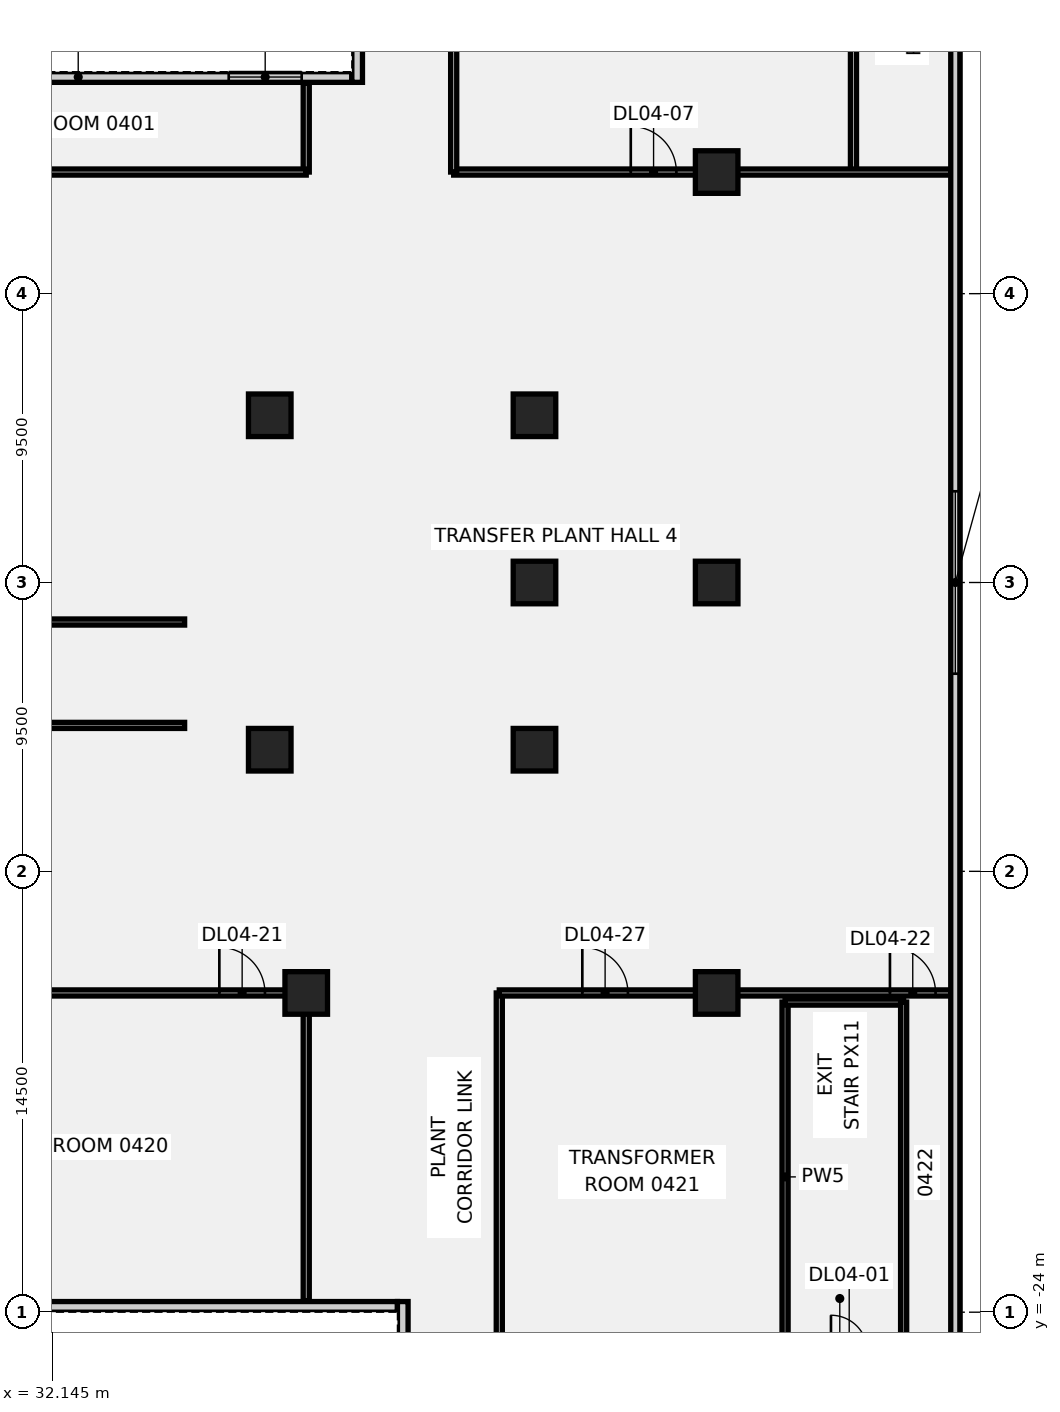
"""IFC4 building model, lengths in metres.
Left out: names, types, materials, properties, quantities, classifications, styles, units other than length and angle.
Written with IfcOpenShell. Run it as: python <this file> out.ifc"""

import sys

from ifc_helpers import new_model, si_unit, direction, frame, frame_2d, origin, origin_2d, place, context, subcontext, project, spatial, polyline, rectangle, outline, extrude, element, fill, save


model = new_model("IFC4")
c1 = context("Model", 3, precision=1e-05, world=origin(), true_north=direction((0.0, 1.0)))
c2 = subcontext(c1, "Body", "Model", "MODEL_VIEW")
j1 = project(units=[si_unit("LENGTHUNIT", "METRE"), si_unit("PLANEANGLEUNIT", "RADIAN")], contexts=[c1])
p1 = place(None, origin())
s1 = spatial("IfcSite", under=j1, at=p1, CompositionType="ELEMENT")
p2 = place(p1, origin())
s2 = spatial("IfcBuilding", under=s1, at=p2, CompositionType="ELEMENT")
p3 = place(p2, frame((0.0, 0.0, 25.0)))
s3 = spatial("IfcBuildingStorey", under=s2, at=p3, CompositionType="ELEMENT", Elevation=25.0)
for number, where, z_axis, x_axis in (
    (1, (39.3, 5.5, -0.45), (0.0, 0.0, 1.0), (1.0, 0.0, 0.0)),
    (2, (39.3, -5.5, -0.45), (0.0, 0.0, 1.0), (1.0, 0.0, 0.0)),
    (3, (48.008, -5.5, -0.45), (0.0, 0.0, 1.0), (1.0, 0.0, 0.0)),
    (4, (48.008, 0.0, -0.45), (0.0, 0.0, 1.0), (1.0, 0.0, 0.0)),
    (5, (48.008, 5.5, -0.45), (0.0, 0.0, 1.0), (1.0, 0.0, 0.0)),
    (6, (40.5, -13.5, -0.45), (0.0, 0.0, 1.0), (1.0, 0.0, 0.0)),
    (7, (54.0, -13.5, -0.45), (0.0, 0.0, 1.0), (1.0, 0.0, 0.0)),
    (8, (54.0, 0.0, -0.45), (0.0, 0.0, 1.0), (1.0, 0.0, 0.0)),
    (9, (54.0, 13.5, -0.45), (0.0, 0.0, 1.0), (1.0, 0.0, 0.0)),
):
    element("IfcColumn", number, at=place(p3, frame(where, z_axis=z_axis, x_axis=x_axis)), inside=s3, PredefinedType="COLUMN", context=c2, shape_type="SweptSolid", body=[
        extrude(rectangle(XDim=1.4, YDim=1.4, at=origin_2d()), origin(), (0.0, 0.0, 1.0), 4.35),
    ])
p4 = place(p3, frame((56.25, -25.3, 0.0), z_axis=(0.0, 0.0, 1.0), x_axis=(0.0, 1.0, 0.0)))
e10 = element("IfcWall", 10, at=p4, inside=s3, PredefinedType="PARTITIONING", context=c2, shape_type="SweptSolid", body=[
    extrude(rectangle(XDim=11.5, YDim=0.2, at=frame_2d((5.75, 0.0))), origin(), (0.0, 0.0, 1.0), 3.9),
])
p5 = place(p3, frame((56.25, -13.8, 0.0), z_axis=(0.0, 0.0, 1.0), x_axis=(1.0, 0.0, 0.0)))
e11 = element("IfcWall", 11, at=p5, inside=s3, PredefinedType="PARTITIONING", context=c2, shape_type="SweptSolid", body=[
    extrude(rectangle(XDim=3.9, YDim=0.2, at=frame_2d((1.95, 0.0))), origin(), (0.0, 0.0, 1.0), 3.9),
])
p6 = place(p3, frame((60.15, -25.3, 0.0), z_axis=(0.0, 0.0, 1.0), x_axis=(0.0, 1.0, 0.0)))
e12 = element("IfcWall", 12, at=p6, inside=s3, PredefinedType="PARTITIONING", context=c2, shape_type="SweptSolid", body=[
    extrude(rectangle(XDim=11.5, YDim=0.2, at=frame_2d((5.75, 0.0))), origin(), (0.0, 0.0, 1.0), 3.9),
])
p7 = place(p3, frame((22.5, -13.5, 0.0), z_axis=(0.0, 0.0, 1.0), x_axis=(1.0, 0.0, 0.0)))
e13 = element("IfcWall", 13, at=p7, inside=s3, PredefinedType="PARTITIONING", context=c2, shape_type="SweptSolid", body=[
    extrude(rectangle(XDim=18.0, YDim=0.2, at=frame_2d((9.0, 0.0))), origin(), (0.0, 0.0, 1.0), 3.9),
])
p8 = place(p7, frame((15.142, 0.0, 0.0)))
e14 = element("IfcOpeningElement", 14, at=p8, cuts=e13, PredefinedType="OPENING", context=c2, shape_type="SweptSolid", body=[
    extrude(rectangle(XDim=1.5, YDim=2.1, at=frame_2d((0.75, 1.05))), frame((0.0, 0.11, 0.0), z_axis=(0.0, -1.0, 0.0), x_axis=(1.0, 0.0, 0.0)), (0.0, 0.0, 1.0), 0.22),
])
p9 = place(p3, frame((40.5, -23.62, 0.0), z_axis=(0.0, 0.0, 1.0), x_axis=(0.0, 1.0, 0.0)))
e15 = element("IfcWall", 15, at=p9, inside=s3, PredefinedType="PARTITIONING", context=c2, shape_type="SweptSolid", body=[
    extrude(rectangle(XDim=10.12, YDim=0.2, at=frame_2d((5.06, 0.0))), origin(), (0.0, 0.0, 1.0), 3.9),
])
p10 = place(p3, frame((40.5, 13.5, 0.0), z_axis=(0.0, 0.0, 1.0), x_axis=(0.0, 1.0, 0.0)))
e16 = element("IfcWall", 16, at=p10, inside=s3, PredefinedType="PARTITIONING", context=c2, shape_type="SweptSolid", body=[
    extrude(rectangle(XDim=2.92, YDim=0.2, at=frame_2d((1.46, 0.0))), origin(), (0.0, 0.0, 1.0), 3.9),
])
p11 = place(p3, frame((22.5, 13.5, 0.0), z_axis=(0.0, 0.0, 1.0), x_axis=(1.0, 0.0, 0.0)))
e17 = element("IfcWall", 17, at=p11, inside=s3, PredefinedType="PARTITIONING", context=c2, shape_type="SweptSolid", body=[
    extrude(rectangle(XDim=18.0, YDim=0.2, at=frame_2d((9.0, 0.0))), origin(), (0.0, 0.0, 1.0), 3.9),
])
p12 = place(p11, frame((4.019, 0.0, 0.0)))
e18 = element("IfcOpeningElement", 18, at=p12, cuts=e17, PredefinedType="OPENING", context=c2, shape_type="SweptSolid", body=[
    extrude(rectangle(XDim=1.5, YDim=2.1, at=frame_2d((0.75, 1.05))), frame((0.0, 0.11, 0.0), z_axis=(0.0, -1.0, 0.0), x_axis=(1.0, 0.0, 0.0)), (0.0, 0.0, 1.0), 0.22),
])
p13 = place(p3, frame((46.85, -25.0, 0.0), z_axis=(0.0, 0.0, 1.0), x_axis=(0.0, 1.0, 0.0)))
e19 = element("IfcWall", 19, at=p13, inside=s3, PredefinedType="PARTITIONING", context=c2, shape_type="SweptSolid", body=[
    extrude(rectangle(XDim=11.5, YDim=0.2, at=frame_2d((5.75, 0.0))), origin(), (0.0, 0.0, 1.0), 3.9),
])
p14 = place(p3, frame((46.85, -13.5, 0.0), z_axis=(0.0, 0.0, 1.0), x_axis=(1.0, 0.0, 0.0)))
e20 = element("IfcWall", 20, at=p14, inside=s3, PredefinedType="PARTITIONING", context=c2, shape_type="SweptSolid", body=[
    extrude(rectangle(XDim=14.849, YDim=0.2, at=frame_2d((7.424, 0.0))), origin(), (0.0, 0.0, 1.0), 3.9),
])
p15 = place(p14, frame((12.85, 0.0, 0.0)))
e21 = element("IfcOpeningElement", 21, at=p15, cuts=e20, PredefinedType="OPENING", context=c2, shape_type="SweptSolid", body=[
    extrude(rectangle(XDim=1.5, YDim=2.1, at=frame_2d((0.75, 1.05))), frame((0.0, 0.11, 0.0), z_axis=(0.0, -1.0, 0.0), x_axis=(1.0, 0.0, 0.0)), (0.0, 0.0, 1.0), 0.22),
])
p16 = place(p14, frame((2.731, 0.0, 0.0)))
e22 = element("IfcOpeningElement", 22, at=p16, cuts=e20, PredefinedType="OPENING", context=c2, shape_type="SweptSolid", body=[
    extrude(rectangle(XDim=1.5, YDim=2.1, at=frame_2d((0.75, 1.05))), frame((0.0, 0.11, 0.0), z_axis=(0.0, -1.0, 0.0), x_axis=(1.0, 0.0, 0.0)), (0.0, 0.0, 1.0), 0.22),
])
p17 = place(p3, frame((58.5, 13.5, 0.0), z_axis=(0.0, 0.0, 1.0), x_axis=(0.0, 1.0, 0.0)))
e23 = element("IfcWall", 23, at=p17, inside=s3, PredefinedType="PARTITIONING", context=c2, shape_type="SweptSolid", body=[
    extrude(rectangle(XDim=11.5, YDim=0.2, at=frame_2d((5.75, 0.0))), origin(), (0.0, 0.0, 1.0), 3.9),
])
p18 = place(p3, frame((45.35, 13.5, 0.0), z_axis=(0.0, 0.0, 1.0), x_axis=(1.0, 0.0, 0.0)))
e24 = element("IfcWall", 24, at=p18, inside=s3, PredefinedType="PARTITIONING", context=c2, shape_type="SweptSolid", body=[
    extrude(rectangle(XDim=16.349, YDim=0.2, at=frame_2d((8.174, 0.0))), origin(), (0.0, 0.0, 1.0), 3.9),
])
p19 = place(p18, frame((5.825, 0.0, 0.0)))
e25 = element("IfcOpeningElement", 25, at=p19, cuts=e24, PredefinedType="OPENING", context=c2, shape_type="SweptSolid", body=[
    extrude(rectangle(XDim=1.5, YDim=2.1, at=frame_2d((0.75, 1.05))), frame((0.0, 0.11, 0.0), z_axis=(0.0, -1.0, 0.0), x_axis=(1.0, 0.0, 0.0)), (0.0, 0.0, 1.0), 0.22),
])
p20 = place(p3, frame((45.35, 13.5, 0.0), z_axis=(0.0, 0.0, 1.0), x_axis=(0.0, 1.0, 0.0)))
e26 = element("IfcWall", 26, at=p20, inside=s3, PredefinedType="PARTITIONING", context=c2, shape_type="SweptSolid", body=[
    extrude(rectangle(XDim=11.5, YDim=0.2, at=frame_2d((5.75, 0.0))), origin(), (0.0, 0.0, 1.0), 3.9),
])
p21 = place(p3, frame((61.85, -50.988, 0.0), z_axis=(0.0, 0.0, 1.0), x_axis=(0.0, 1.0, 0.0)))
e27 = element("IfcWall", 27, at=p21, inside=s3, PredefinedType="SOLIDWALL", context=c2, shape_type="SweptSolid", body=[
    extrude(rectangle(XDim=101.977, YDim=0.3, at=frame_2d((50.988, 0.0))), origin(), (0.0, 0.0, 1.0), 3.9),
])
p22 = place(p21, frame((47.988, 0.0, 1.4)))
e28 = element("IfcOpeningElement", 28, at=p22, cuts=e27, PredefinedType="OPENING", context=c2, shape_type="SweptSolid", body=[
    extrude(rectangle(XDim=6.0, YDim=2.2, at=frame_2d((3.0, 1.1))), frame((0.0, 0.16, 0.0), z_axis=(0.0, -1.0, 0.0), x_axis=(1.0, 0.0, 0.0)), (0.0, 0.0, 1.0), 0.32),
])
p23 = place(p3, frame((24.0, 16.625, 0.0), z_axis=(0.0, 0.0, 1.0), x_axis=(1.0, 0.0, 0.0)))
e29 = element("IfcWall", 29, at=p23, inside=s3, PredefinedType="SOLIDWALL", context=c2, shape_type="SweptSolid", body=[
    extrude(rectangle(XDim=18.0, YDim=0.35, at=frame_2d((9.0, 0.0))), origin(), (0.0, 0.0, 1.0), 3.9),
])
p24 = place(p23, frame((13.95, 0.0, 1.0)))
e30 = element("IfcOpeningElement", 30, at=p24, cuts=e29, PredefinedType="OPENING", context=c2, shape_type="SweptSolid", body=[
    extrude(rectangle(XDim=2.4, YDim=1.8, at=frame_2d((1.2, 0.9))), frame((0.0, 0.185, 0.0), z_axis=(0.0, -1.0, 0.0), x_axis=(1.0, 0.0, 0.0)), (0.0, 0.0, 1.0), 0.37),
])
p25 = place(p3, frame((42.175, 16.45, 0.0), z_axis=(0.0, 0.0, 1.0), x_axis=(0.0, 1.0, 0.0)))
e31 = element("IfcWall", 31, at=p25, inside=s3, PredefinedType="SOLIDWALL", context=c2, shape_type="SweptSolid", body=[
    extrude(rectangle(XDim=27.4, YDim=0.35, at=frame_2d((13.7, 0.0))), origin(), (0.0, 0.0, 1.0), 3.9),
])
p26 = place(p25, frame((14.9, 0.0, 1.0)))
e32 = element("IfcOpeningElement", 32, at=p26, cuts=e31, PredefinedType="OPENING", context=c2, shape_type="SweptSolid", body=[
    extrude(rectangle(XDim=2.4, YDim=1.8, at=frame_2d((1.2, 0.9))), frame((0.0, 0.185, 0.0), z_axis=(0.0, -1.0, 0.0), x_axis=(1.0, 0.0, 0.0)), (0.0, 0.0, 1.0), 0.37),
])
p27 = place(p3, frame((16.8, -23.825, 0.0), z_axis=(0.0, 0.0, 1.0), x_axis=(1.0, 0.0, 0.0)))
e33 = element("IfcWall", 33, at=p27, inside=s3, PredefinedType="SOLIDWALL", context=c2, shape_type="SweptSolid", body=[
    extrude(rectangle(XDim=26.7, YDim=0.35, at=frame_2d((13.35, 0.0))), origin(), (0.0, 0.0, 1.0), 3.9),
])
p28 = place(p3, frame((43.675, -42.35, 0.0), z_axis=(0.0, 0.0, 1.0), x_axis=(0.0, 1.0, 0.0)))
e34 = element("IfcWall", 34, at=p28, inside=s3, PredefinedType="SOLIDWALL", context=c2, shape_type="SweptSolid", body=[
    extrude(rectangle(XDim=18.7, YDim=0.35, at=frame_2d((9.35, 0.0))), origin(), (0.0, 0.0, 1.0), 3.9),
])
p29 = place(p28, frame((4.4, 0.0, 1.0)))
e35 = element("IfcOpeningElement", 35, at=p29, cuts=e34, PredefinedType="OPENING", context=c2, shape_type="SweptSolid", body=[
    extrude(rectangle(XDim=2.4, YDim=1.8, at=frame_2d((1.2, 0.9))), frame((0.0, 0.185, 0.0), z_axis=(0.0, -1.0, 0.0), x_axis=(1.0, 0.0, 0.0)), (0.0, 0.0, 1.0), 0.37),
])
p30 = place(p3, frame((29.8, -1.3, 0.0), z_axis=(0.0, 0.0, 1.0), x_axis=(1.0, 0.0, 0.0)))
e36 = element("IfcWall", 36, at=p30, inside=s3, PredefinedType="SHEAR", context=c2, shape_type="SweptSolid", body=[
    extrude(rectangle(XDim=6.7, YDim=0.2, at=frame_2d((3.35, 0.0))), origin(), (0.0, 0.0, 1.0), 3.9),
])
p31 = place(p30, frame((0.35, 0.0, 0.0)))
e37 = element("IfcOpeningElement", 37, at=p31, cuts=e36, PredefinedType="OPENING", context=c2, shape_type="SweptSolid", body=[
    extrude(rectangle(XDim=1.0, YDim=2.1, at=frame_2d((0.5, 1.05))), frame((0.0, 0.11, 0.0), z_axis=(0.0, -1.0, 0.0), x_axis=(1.0, 0.0, 0.0)), (0.0, 0.0, 1.0), 0.22),
])
p32 = place(p3, frame((29.8, -4.7, 0.0), z_axis=(0.0, 0.0, 1.0), x_axis=(1.0, 0.0, 0.0)))
e38 = element("IfcWall", 38, at=p32, inside=s3, PredefinedType="SHEAR", context=c2, shape_type="SweptSolid", body=[
    extrude(rectangle(XDim=6.7, YDim=0.2, at=frame_2d((3.35, 0.0))), origin(), (0.0, 0.0, 1.0), 3.9),
])
p33 = place(p3, origin())
e39 = element("IfcWall", 39, at=p33, inside=s3, PredefinedType="SHEAR", context=c2, shape_type="SweptSolid", body=[
    extrude(outline(polyline([(36.3, -4.6), (36.5, -4.6), (36.5, -1.4), (36.3, -1.4), (36.3, -4.6)])), origin(), (0.0, 0.0, 1.0), 3.9),
])
p34 = place(p19, origin())
e40 = element("IfcDoor", 40, at=p34, inside=s3, OperationType="SINGLE_SWING_LEFT", PredefinedType="DOOR", context=c2, shape_type="SweptSolid", body=[
    extrude(rectangle(XDim=1.5, YDim=2.1, at=frame_2d((0.75, 1.05))), frame((0.0, 0.025, 0.0), z_axis=(0.0, -1.0, 0.0), x_axis=(1.0, 0.0, 0.0)), (0.0, 0.0, 1.0), 0.05),
])
fill(e25, e40)
p35 = place(p8, origin())
e41 = element("IfcDoor", 41, at=p35, inside=s3, OperationType="SINGLE_SWING_LEFT", PredefinedType="DOOR", context=c2, shape_type="SweptSolid", body=[
    extrude(rectangle(XDim=1.5, YDim=2.1, at=frame_2d((0.75, 1.05))), frame((0.0, 0.025, 0.0), z_axis=(0.0, -1.0, 0.0), x_axis=(1.0, 0.0, 0.0)), (0.0, 0.0, 1.0), 0.05),
])
fill(e14, e41)
p36 = place(p15, origin())
e42 = element("IfcDoor", 42, at=p36, inside=s3, OperationType="SINGLE_SWING_RIGHT", PredefinedType="DOOR", context=c2, shape_type="SweptSolid", body=[
    extrude(rectangle(XDim=1.5, YDim=2.1, at=frame_2d((0.75, 1.05))), frame((0.0, 0.025, 0.0), z_axis=(0.0, -1.0, 0.0), x_axis=(1.0, 0.0, 0.0)), (0.0, 0.0, 1.0), 0.05),
])
fill(e21, e42)
p37 = place(p16, origin())
e43 = element("IfcDoor", 43, at=p37, inside=s3, OperationType="SINGLE_SWING_LEFT", PredefinedType="DOOR", context=c2, shape_type="SweptSolid", body=[
    extrude(rectangle(XDim=1.5, YDim=2.1, at=frame_2d((0.75, 1.05))), frame((0.0, 0.025, 0.0), z_axis=(0.0, -1.0, 0.0), x_axis=(1.0, 0.0, 0.0)), (0.0, 0.0, 1.0), 0.05),
])
fill(e22, e43)
p38 = place(p22, origin())
e44 = element("IfcWindow", 44, at=p38, inside=s3, PartitioningType="SINGLE_PANEL", PredefinedType="WINDOW", context=c2, shape_type="SweptSolid", body=[
    extrude(rectangle(XDim=6.0, YDim=2.2, at=frame_2d((3.0, 1.1))), frame((0.0, 0.03, 0.0), z_axis=(0.0, -1.0, 0.0), x_axis=(1.0, 0.0, 0.0)), (0.0, 0.0, 1.0), 0.06),
])
fill(e28, e44)
p39 = place(p24, origin())
e45 = element("IfcWindow", 45, at=p39, inside=s3, PartitioningType="SINGLE_PANEL", PredefinedType="WINDOW", context=c2, shape_type="SweptSolid", body=[
    extrude(rectangle(XDim=2.4, YDim=1.8, at=frame_2d((1.2, 0.9))), frame((0.0, 0.03, 0.0), z_axis=(0.0, -1.0, 0.0), x_axis=(1.0, 0.0, 0.0)), (0.0, 0.0, 1.0), 0.06),
])
fill(e30, e45)
save(model, sys.argv[1])
